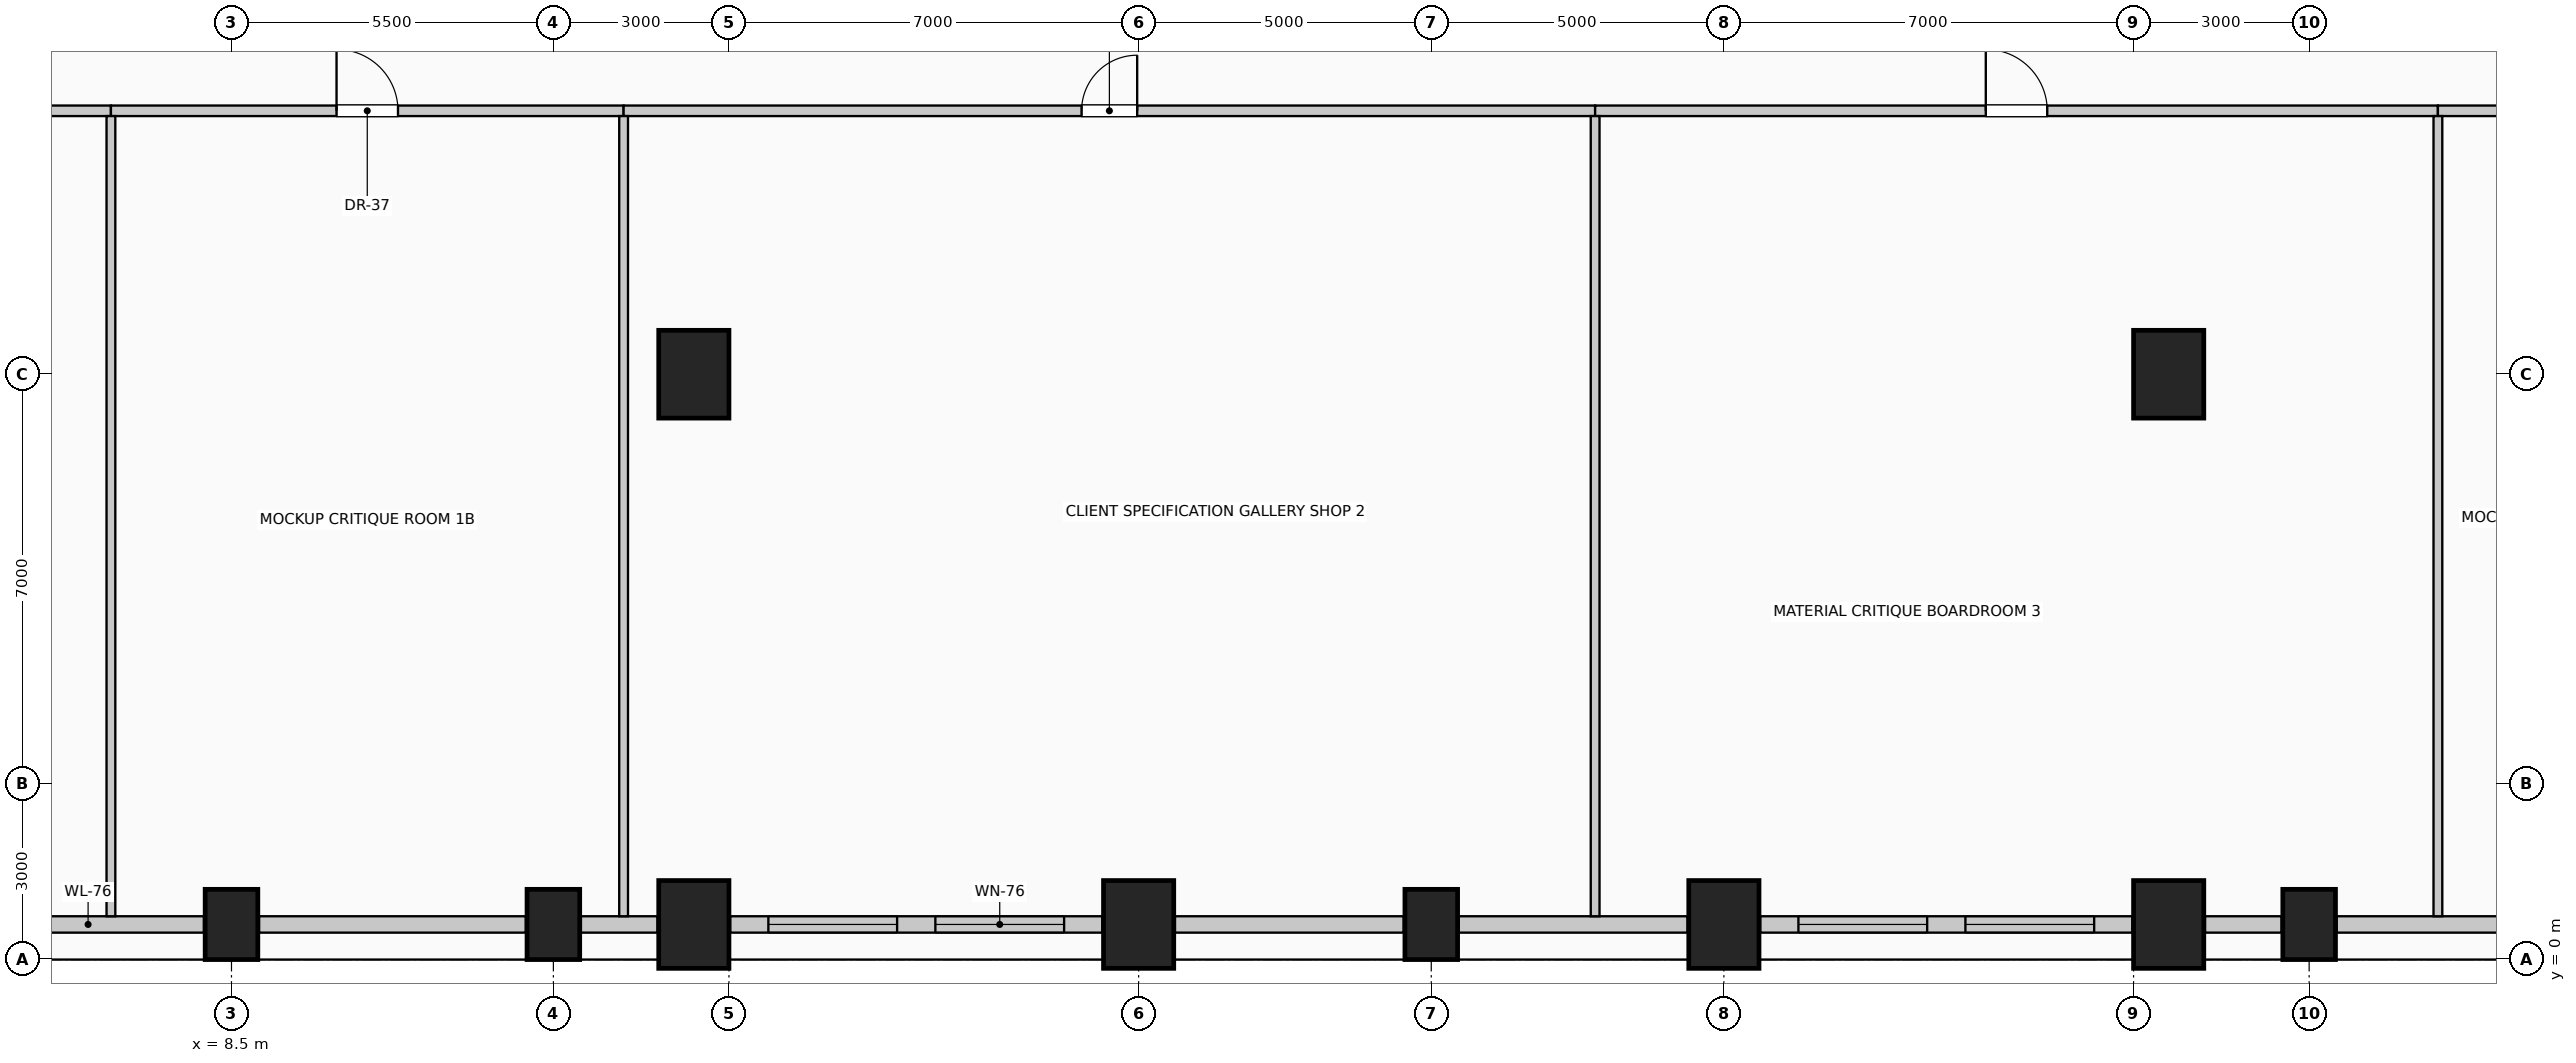
"""IFC4 building model, lengths in metres.
Left out: names, types, materials, properties, quantities, classifications, styles, units other than length and angle.
Written with IfcOpenShell. Run it as: python <this file> out.ifc"""

import sys

from ifc_helpers import new_model, si_unit, direction, frame, frame_2d, origin, origin_2d, place, context, subcontext, project, spatial, rectangle, extrude, element, fill, save


model = new_model("IFC4")
c1 = context("Model", 3, precision=1e-05, world=origin(), true_north=direction((0.0, 1.0)))
c2 = subcontext(c1, "Body", "Model", "MODEL_VIEW")
j1 = project(units=[si_unit("LENGTHUNIT", "METRE"), si_unit("PLANEANGLEUNIT", "RADIAN")], contexts=[c1])
p1 = place(None, origin())
s1 = spatial("IfcSite", under=j1, at=p1, CompositionType="ELEMENT")
p2 = place(p1, origin())
s2 = spatial("IfcBuilding", under=s1, at=p2, CompositionType="ELEMENT")
p3 = place(p2, frame((0.0, 0.0, 58.6)))
s3 = spatial("IfcBuildingStorey", under=s2, at=p3, CompositionType="ELEMENT", Elevation=58.6)
for number, where, z_axis, x_axis in (
    (1, (8.5, 0.6, 0.0), (0.0, 0.0, 1.0), (1.0, 0.0, 0.0)),
    (2, (14.0, 0.6, 0.0), (0.0, 0.0, 1.0), (1.0, 0.0, 0.0)),
):
    element("IfcColumn", number, at=place(p3, frame(where, z_axis=z_axis, x_axis=x_axis)), inside=s3, PredefinedType="COLUMN", context=c2, shape_type="SweptSolid", body=[
        extrude(rectangle(XDim=0.9, YDim=1.2, at=origin_2d()), origin(), (0.0, 0.0, 1.0), 4.0),
    ])
for number, where, z_axis, x_axis in (
    (3, (16.4, 0.6, 0.0), (0.0, 0.0, 1.0), (1.0, 0.0, 0.0)),
    (4, (24.0, 0.6, 0.0), (0.0, 0.0, 1.0), (1.0, 0.0, 0.0)),
):
    element("IfcColumn", number, at=place(p3, frame(where, z_axis=z_axis, x_axis=x_axis)), inside=s3, PredefinedType="COLUMN", context=c2, shape_type="SweptSolid", body=[
        extrude(rectangle(XDim=1.2, YDim=1.5, at=origin_2d()), origin(), (0.0, 0.0, 1.0), 4.0),
    ])
p4 = place(p3, frame((29.0, 0.6, 0.0), z_axis=(0.0, 0.0, 1.0), x_axis=(1.0, 0.0, 0.0)))
e5 = element("IfcColumn", 5, at=p4, inside=s3, PredefinedType="COLUMN", context=c2, shape_type="SweptSolid", body=[
    extrude(rectangle(XDim=0.9, YDim=1.2, at=origin_2d()), origin(), (0.0, 0.0, 1.0), 4.0),
])
for number, where, z_axis, x_axis in (
    (6, (34.0, 0.6, 0.0), (0.0, 0.0, 1.0), (1.0, 0.0, 0.0)),
    (7, (41.6, 0.6, 0.0), (0.0, 0.0, 1.0), (1.0, 0.0, 0.0)),
):
    element("IfcColumn", number, at=place(p3, frame(where, z_axis=z_axis, x_axis=x_axis)), inside=s3, PredefinedType="COLUMN", context=c2, shape_type="SweptSolid", body=[
        extrude(rectangle(XDim=1.2, YDim=1.5, at=origin_2d()), origin(), (0.0, 0.0, 1.0), 4.0),
    ])
p5 = place(p3, frame((44.0, 0.6, 0.0), z_axis=(0.0, 0.0, 1.0), x_axis=(1.0, 0.0, 0.0)))
e8 = element("IfcColumn", 8, at=p5, inside=s3, PredefinedType="COLUMN", context=c2, shape_type="SweptSolid", body=[
    extrude(rectangle(XDim=0.9, YDim=1.2, at=origin_2d()), origin(), (0.0, 0.0, 1.0), 4.0),
])
for number, where, z_axis, x_axis in (
    (9, (16.4, 10.0, 0.0), (0.0, 0.0, 1.0), (1.0, 0.0, 0.0)),
    (10, (41.6, 10.0, 0.0), (0.0, 0.0, 1.0), (1.0, 0.0, 0.0)),
):
    element("IfcColumn", number, at=place(p3, frame(where, z_axis=z_axis, x_axis=x_axis)), inside=s3, PredefinedType="COLUMN", context=c2, shape_type="SweptSolid", body=[
        extrude(rectangle(XDim=1.2, YDim=1.5, at=origin_2d()), origin(), (0.0, 0.0, 1.0), 4.0),
    ])
p6 = place(p3, frame((8.03, 0.6, 0.0), z_axis=(0.0, 0.0, 1.0), x_axis=(-1.0, 0.0, 0.0)))
e11 = element("IfcWall", 11, at=p6, inside=s3, PredefinedType="SOLIDWALL", context=c2, shape_type="SweptSolid", body=[
    extrude(rectangle(XDim=3.96, YDim=0.28, at=frame_2d((1.98, 0.0))), origin(), (0.0, 0.0, 1.0), 2.85),
])
p7 = place(p3, frame((13.53, 0.6, 0.0), z_axis=(0.0, 0.0, 1.0), x_axis=(-1.0, 0.0, 0.0)))
e12 = element("IfcWall", 12, at=p7, inside=s3, PredefinedType="SOLIDWALL", context=c2, shape_type="SweptSolid", body=[
    extrude(rectangle(XDim=4.56, YDim=0.28, at=frame_2d((2.28, 0.0))), origin(), (0.0, 0.0, 1.0), 2.85),
])
p8 = place(p3, frame((15.78, 0.6, 0.0), z_axis=(0.0, 0.0, 1.0), x_axis=(-1.0, 0.0, 0.0)))
e13 = element("IfcWall", 13, at=p8, inside=s3, PredefinedType="SOLIDWALL", context=c2, shape_type="SweptSolid", body=[
    extrude(rectangle(XDim=1.31, YDim=0.28, at=frame_2d((0.655, 0.0))), origin(), (0.0, 0.0, 1.0), 2.85),
])
p9 = place(p3, frame((23.38, 0.6, 0.0), z_axis=(0.0, 0.0, 1.0), x_axis=(-1.0, 0.0, 0.0)))
e14 = element("IfcWall", 14, at=p9, inside=s3, PredefinedType="SOLIDWALL", context=c2, shape_type="SweptSolid", body=[
    extrude(rectangle(XDim=6.36, YDim=0.28, at=frame_2d((3.18, 0.0))), origin(), (0.0, 0.0, 1.0), 2.85),
])
p10 = place(p9, frame((0.653, 0.0, 0.5)))
e15 = element("IfcOpeningElement", 15, at=p10, cuts=e14, PredefinedType="OPENING", context=c2, shape_type="SweptSolid", body=[
    extrude(rectangle(XDim=2.2, YDim=1.95, at=frame_2d((1.1, 0.975))), frame((0.0, 0.15, 0.0), z_axis=(0.0, -1.0, 0.0), x_axis=(1.0, 0.0, 0.0)), (0.0, 0.0, 1.0), 0.3),
])
p11 = place(p9, frame((3.507, 0.0, 0.5)))
e16 = element("IfcOpeningElement", 16, at=p11, cuts=e14, PredefinedType="OPENING", context=c2, shape_type="SweptSolid", body=[
    extrude(rectangle(XDim=2.2, YDim=1.95, at=frame_2d((1.1, 0.975))), frame((0.0, 0.15, 0.0), z_axis=(0.0, -1.0, 0.0), x_axis=(1.0, 0.0, 0.0)), (0.0, 0.0, 1.0), 0.3),
])
for number, where, z_axis, x_axis in (
    (17, (28.53, 0.6, 0.0), (0.0, 0.0, 1.0), (-1.0, 0.0, 0.0)),
    (18, (33.38, 0.6, 0.0), (0.0, 0.0, 1.0), (-1.0, 0.0, 0.0)),
):
    element("IfcWall", number, at=place(p3, frame(where, z_axis=z_axis, x_axis=x_axis)), inside=s3, PredefinedType="SOLIDWALL", context=c2, shape_type="SweptSolid", body=[
        extrude(rectangle(XDim=3.91, YDim=0.28, at=frame_2d((1.955, 0.0))), origin(), (0.0, 0.0, 1.0), 2.85),
    ])
p12 = place(p3, frame((40.98, 0.6, 0.0), z_axis=(0.0, 0.0, 1.0), x_axis=(-1.0, 0.0, 0.0)))
e19 = element("IfcWall", 19, at=p12, inside=s3, PredefinedType="SOLIDWALL", context=c2, shape_type="SweptSolid", body=[
    extrude(rectangle(XDim=6.36, YDim=0.28, at=frame_2d((3.18, 0.0))), origin(), (0.0, 0.0, 1.0), 2.85),
])
p13 = place(p12, frame((0.653, 0.0, 0.5)))
e20 = element("IfcOpeningElement", 20, at=p13, cuts=e19, PredefinedType="OPENING", context=c2, shape_type="SweptSolid", body=[
    extrude(rectangle(XDim=2.2, YDim=1.95, at=frame_2d((1.1, 0.975))), frame((0.0, 0.15, 0.0), z_axis=(0.0, -1.0, 0.0), x_axis=(1.0, 0.0, 0.0)), (0.0, 0.0, 1.0), 0.3),
])
p14 = place(p12, frame((3.507, 0.0, 0.5)))
e21 = element("IfcOpeningElement", 21, at=p14, cuts=e19, PredefinedType="OPENING", context=c2, shape_type="SweptSolid", body=[
    extrude(rectangle(XDim=2.2, YDim=1.95, at=frame_2d((1.1, 0.975))), frame((0.0, 0.15, 0.0), z_axis=(0.0, -1.0, 0.0), x_axis=(1.0, 0.0, 0.0)), (0.0, 0.0, 1.0), 0.3),
])
p15 = place(p3, frame((43.53, 0.6, 0.0), z_axis=(0.0, 0.0, 1.0), x_axis=(-1.0, 0.0, 0.0)))
e22 = element("IfcWall", 22, at=p15, inside=s3, PredefinedType="SOLIDWALL", context=c2, shape_type="SweptSolid", body=[
    extrude(rectangle(XDim=1.31, YDim=0.28, at=frame_2d((0.655, 0.0))), origin(), (0.0, 0.0, 1.0), 2.85),
])
p16 = place(p3, frame((49.03, 0.6, 0.0), z_axis=(0.0, 0.0, 1.0), x_axis=(-1.0, 0.0, 0.0)))
e23 = element("IfcWall", 23, at=p16, inside=s3, PredefinedType="SOLIDWALL", context=c2, shape_type="SweptSolid", body=[
    extrude(rectangle(XDim=4.56, YDim=0.28, at=frame_2d((2.28, 0.0))), origin(), (0.0, 0.0, 1.0), 2.85),
])
p17 = place(p3, frame((0.74, 14.5, 0.0), z_axis=(0.0, 0.0, 1.0), x_axis=(1.0, 0.0, 0.0)))
e24 = element("IfcWall", 24, at=p17, inside=s3, PredefinedType="PARTITIONING", context=c2, shape_type="SweptSolid", body=[
    extrude(rectangle(XDim=5.7, YDim=0.18, at=frame_2d((2.85, 0.0))), origin(), (0.0, 0.0, 1.0), 3.7),
])
p18 = place(p17, frame((2.375, 0.0, 0.0)))
e25 = element("IfcOpeningElement", 25, at=p18, cuts=e24, PredefinedType="OPENING", context=c2, shape_type="SweptSolid", body=[
    extrude(rectangle(XDim=0.95, YDim=2.15, at=frame_2d((0.475, 1.075))), frame((0.0, 0.1, 0.0), z_axis=(0.0, -1.0, 0.0), x_axis=(1.0, 0.0, 0.0)), (0.0, 0.0, 1.0), 0.2),
])
p19 = place(p3, frame((6.44, 14.5, 0.0), z_axis=(0.0, 0.0, 1.0), x_axis=(1.0, 0.0, 0.0)))
e26 = element("IfcWall", 26, at=p19, inside=s3, PredefinedType="PARTITIONING", context=c2, shape_type="SweptSolid", body=[
    extrude(rectangle(XDim=8.76, YDim=0.18, at=frame_2d((4.38, 0.0))), origin(), (0.0, 0.0, 1.0), 3.7),
])
p20 = place(p19, frame((3.855, 0.0, 0.0)))
e27 = element("IfcOpeningElement", 27, at=p20, cuts=e26, PredefinedType="OPENING", context=c2, shape_type="SweptSolid", body=[
    extrude(rectangle(XDim=1.05, YDim=2.15, at=frame_2d((0.525, 1.075))), frame((0.0, 0.1, 0.0), z_axis=(0.0, -1.0, 0.0), x_axis=(1.0, 0.0, 0.0)), (0.0, 0.0, 1.0), 0.2),
])
p21 = place(p3, frame((15.2, 14.5, 0.0), z_axis=(0.0, 0.0, 1.0), x_axis=(1.0, 0.0, 0.0)))
e28 = element("IfcWall", 28, at=p21, inside=s3, PredefinedType="PARTITIONING", context=c2, shape_type="SweptSolid", body=[
    extrude(rectangle(XDim=16.6, YDim=0.18, at=frame_2d((8.3, 0.0))), origin(), (0.0, 0.0, 1.0), 3.7),
])
p22 = place(p21, frame((7.825, 0.0, 0.0)))
e29 = element("IfcOpeningElement", 29, at=p22, cuts=e28, PredefinedType="OPENING", context=c2, shape_type="SweptSolid", body=[
    extrude(rectangle(XDim=0.95, YDim=2.15, at=frame_2d((0.475, 1.075))), frame((0.0, 0.1, 0.0), z_axis=(0.0, -1.0, 0.0), x_axis=(1.0, 0.0, 0.0)), (0.0, 0.0, 1.0), 0.2),
])
p23 = place(p3, frame((31.8, 14.5, 0.0), z_axis=(0.0, 0.0, 1.0), x_axis=(1.0, 0.0, 0.0)))
e30 = element("IfcWall", 30, at=p23, inside=s3, PredefinedType="PARTITIONING", context=c2, shape_type="SweptSolid", body=[
    extrude(rectangle(XDim=14.4, YDim=0.18, at=frame_2d((7.2, 0.0))), origin(), (0.0, 0.0, 1.0), 3.7),
])
p24 = place(p23, frame((6.675, 0.0, 0.0)))
e31 = element("IfcOpeningElement", 31, at=p24, cuts=e30, PredefinedType="OPENING", context=c2, shape_type="SweptSolid", body=[
    extrude(rectangle(XDim=1.05, YDim=2.15, at=frame_2d((0.525, 1.075))), frame((0.0, 0.1, 0.0), z_axis=(0.0, -1.0, 0.0), x_axis=(1.0, 0.0, 0.0)), (0.0, 0.0, 1.0), 0.2),
])
p25 = place(p3, frame((46.2, 14.5, 0.0), z_axis=(0.0, 0.0, 1.0), x_axis=(1.0, 0.0, 0.0)))
e32 = element("IfcWall", 32, at=p25, inside=s3, PredefinedType="PARTITIONING", context=c2, shape_type="SweptSolid", body=[
    extrude(rectangle(XDim=4.48, YDim=0.18, at=frame_2d((2.24, 0.0))), origin(), (0.0, 0.0, 1.0), 3.7),
])
p26 = place(p25, frame((1.765, 0.0, 0.0)))
e33 = element("IfcOpeningElement", 33, at=p26, cuts=e32, PredefinedType="OPENING", context=c2, shape_type="SweptSolid", body=[
    extrude(rectangle(XDim=0.95, YDim=2.15, at=frame_2d((0.475, 1.075))), frame((0.0, 0.1, 0.0), z_axis=(0.0, -1.0, 0.0), x_axis=(1.0, 0.0, 0.0)), (0.0, 0.0, 1.0), 0.2),
])
for number, where, z_axis, x_axis in (
    (34, (6.44, 0.74, 0.0), (0.0, 0.0, 1.0), (0.0, 1.0, 0.0)),
    (35, (15.2, 0.74, 0.0), (0.0, 0.0, 1.0), (0.0, 1.0, 0.0)),
    (36, (31.8, 0.74, 0.0), (0.0, 0.0, 1.0), (0.0, 1.0, 0.0)),
    (37, (46.2, 0.74, 0.0), (0.0, 0.0, 1.0), (0.0, 1.0, 0.0)),
):
    element("IfcWall", number, at=place(p3, frame(where, z_axis=z_axis, x_axis=x_axis)), inside=s3, PredefinedType="PARTITIONING", context=c2, shape_type="SweptSolid", body=[
        extrude(rectangle(XDim=13.67, YDim=0.15, at=frame_2d((6.835, 0.0))), origin(), (0.0, 0.0, 1.0), 3.7),
    ])
p27 = place(p10, origin())
e38 = element("IfcWindow", 38, at=p27, inside=s3, PartitioningType="SINGLE_PANEL", PredefinedType="WINDOW", context=c2, shape_type="SweptSolid", body=[
    extrude(rectangle(XDim=2.2, YDim=1.95, at=frame_2d((1.1, 0.975))), frame((0.0, 0.03, 0.0), z_axis=(0.0, -1.0, 0.0), x_axis=(1.0, 0.0, 0.0)), (0.0, 0.0, 1.0), 0.06),
])
fill(e15, e38)
p28 = place(p11, origin())
e39 = element("IfcWindow", 39, at=p28, inside=s3, PartitioningType="SINGLE_PANEL", PredefinedType="WINDOW", context=c2, shape_type="SweptSolid", body=[
    extrude(rectangle(XDim=2.2, YDim=1.95, at=frame_2d((1.1, 0.975))), frame((0.0, 0.03, 0.0), z_axis=(0.0, -1.0, 0.0), x_axis=(1.0, 0.0, 0.0)), (0.0, 0.0, 1.0), 0.06),
])
fill(e16, e39)
p29 = place(p13, origin())
e40 = element("IfcWindow", 40, at=p29, inside=s3, PartitioningType="SINGLE_PANEL", PredefinedType="WINDOW", context=c2, shape_type="SweptSolid", body=[
    extrude(rectangle(XDim=2.2, YDim=1.95, at=frame_2d((1.1, 0.975))), frame((0.0, 0.03, 0.0), z_axis=(0.0, -1.0, 0.0), x_axis=(1.0, 0.0, 0.0)), (0.0, 0.0, 1.0), 0.06),
])
fill(e20, e40)
p30 = place(p14, origin())
e41 = element("IfcWindow", 41, at=p30, inside=s3, PartitioningType="SINGLE_PANEL", PredefinedType="WINDOW", context=c2, shape_type="SweptSolid", body=[
    extrude(rectangle(XDim=2.2, YDim=1.95, at=frame_2d((1.1, 0.975))), frame((0.0, 0.03, 0.0), z_axis=(0.0, -1.0, 0.0), x_axis=(1.0, 0.0, 0.0)), (0.0, 0.0, 1.0), 0.06),
])
fill(e21, e41)
p31 = place(p20, origin())
e42 = element("IfcDoor", 42, at=p31, inside=s3, OperationType="SINGLE_SWING_LEFT", PredefinedType="DOOR", context=c2, shape_type="SweptSolid", body=[
    extrude(rectangle(XDim=1.05, YDim=2.15, at=frame_2d((0.525, 1.075))), frame((0.0, 0.025, 0.0), z_axis=(0.0, -1.0, 0.0), x_axis=(1.0, 0.0, 0.0)), (0.0, 0.0, 1.0), 0.05),
])
fill(e27, e42)
p32 = place(p22, origin())
e43 = element("IfcDoor", 43, at=p32, inside=s3, OperationType="SINGLE_SWING_RIGHT", PredefinedType="DOOR", context=c2, shape_type="SweptSolid", body=[
    extrude(rectangle(XDim=0.95, YDim=2.15, at=frame_2d((0.475, 1.075))), frame((0.0, 0.025, 0.0), z_axis=(0.0, -1.0, 0.0), x_axis=(1.0, 0.0, 0.0)), (0.0, 0.0, 1.0), 0.05),
])
fill(e29, e43)
p33 = place(p24, origin())
e44 = element("IfcDoor", 44, at=p33, inside=s3, OperationType="SINGLE_SWING_LEFT", PredefinedType="DOOR", context=c2, shape_type="SweptSolid", body=[
    extrude(rectangle(XDim=1.05, YDim=2.15, at=frame_2d((0.525, 1.075))), frame((0.0, 0.025, 0.0), z_axis=(0.0, -1.0, 0.0), x_axis=(1.0, 0.0, 0.0)), (0.0, 0.0, 1.0), 0.05),
])
fill(e31, e44)
save(model, sys.argv[1])
